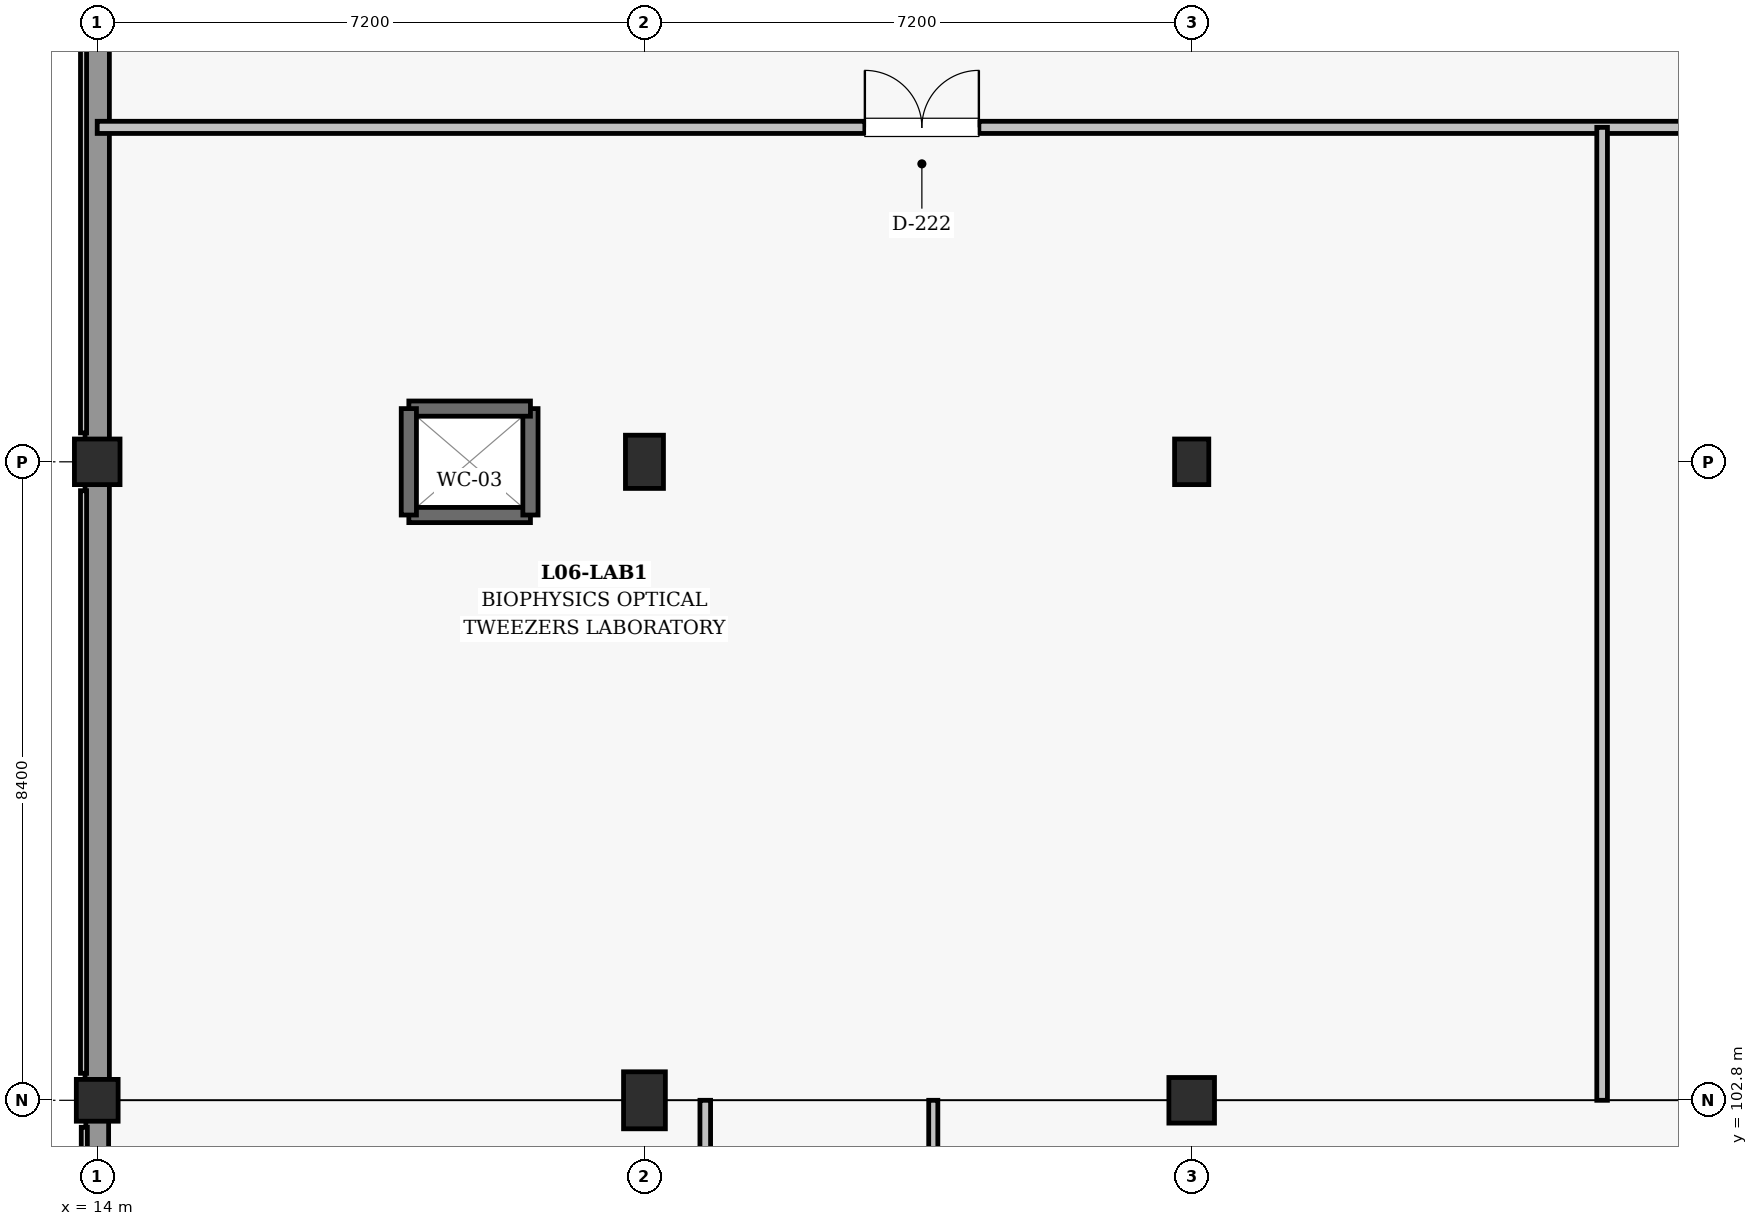
"""IFC4 building model, lengths in metres.
Left out: names, types, materials, properties, quantities, classifications, styles, units other than length and angle.
Written with IfcOpenShell. Run it as: python <this file> out.ifc"""

import sys

from ifc_helpers import new_model, si_unit, direction, frame, frame_2d, origin, origin_2d, place, context, subcontext, project, spatial, rectangle, extrude, element, fill, save


model = new_model("IFC4")
c1 = context("Model", 3, precision=1e-05, world=origin(), true_north=direction((0.0, 1.0)))
c2 = subcontext(c1, "Body", "Model", "MODEL_VIEW")
j1 = project(units=[si_unit("LENGTHUNIT", "METRE"), si_unit("PLANEANGLEUNIT", "RADIAN")], contexts=[c1])
p1 = place(None, origin())
s1 = spatial("IfcSite", under=j1, at=p1, CompositionType="ELEMENT")
p2 = place(p1, origin())
s2 = spatial("IfcBuilding", under=s1, at=p2, CompositionType="ELEMENT")
p3 = place(p2, frame((0.0, 0.0, 27.9)))
s3 = spatial("IfcBuildingStorey", under=s2, at=p3, CompositionType="ELEMENT", Elevation=27.9)
p4 = place(p3, frame((14.0, 102.8, 0.0), z_axis=(0.0, 0.0, 1.0), x_axis=(1.0, 0.0, 0.0)))
e1 = element("IfcColumn", 1, at=p4, inside=s3, PredefinedType="COLUMN", context=c2, shape_type="SweptSolid", body=[
    extrude(rectangle(XDim=0.55, YDim=0.55, at=origin_2d()), origin(), (0.0, 0.0, 1.0), 4.5),
])
p5 = place(p3, frame((14.0, 111.2, 0.0), z_axis=(0.0, 0.0, 1.0), x_axis=(1.0, 0.0, 0.0)))
e2 = element("IfcColumn", 2, at=p5, inside=s3, PredefinedType="COLUMN", context=c2, shape_type="SweptSolid", body=[
    extrude(rectangle(XDim=0.6, YDim=0.6, at=origin_2d()), origin(), (0.0, 0.0, 1.0), 4.5),
])
p6 = place(p3, frame((21.2, 102.8, 0.0), z_axis=(0.0, 0.0, 1.0), x_axis=(1.0, 0.0, 0.0)))
e3 = element("IfcColumn", 3, at=p6, inside=s3, PredefinedType="COLUMN", context=c2, shape_type="SweptSolid", body=[
    extrude(rectangle(XDim=0.55, YDim=0.75, at=origin_2d()), origin(), (0.0, 0.0, 1.0), 4.5),
])
p7 = place(p3, frame((21.2, 111.2, 0.0), z_axis=(0.0, 0.0, 1.0), x_axis=(1.0, 0.0, 0.0)))
e4 = element("IfcColumn", 4, at=p7, inside=s3, PredefinedType="COLUMN", context=c2, shape_type="SweptSolid", body=[
    extrude(rectangle(XDim=0.5, YDim=0.7, at=origin_2d()), origin(), (0.0, 0.0, 1.0), 4.5),
])
p8 = place(p3, frame((28.4, 102.8, 0.0), z_axis=(0.0, 0.0, 1.0), x_axis=(1.0, 0.0, 0.0)))
e5 = element("IfcColumn", 5, at=p8, inside=s3, PredefinedType="COLUMN", context=c2, shape_type="SweptSolid", body=[
    extrude(rectangle(XDim=0.6, YDim=0.6, at=origin_2d()), origin(), (0.0, 0.0, 1.0), 4.5),
])
p9 = place(p3, frame((28.4, 111.2, 0.0), z_axis=(0.0, 0.0, 1.0), x_axis=(1.0, 0.0, 0.0)))
e6 = element("IfcColumn", 6, at=p9, inside=s3, PredefinedType="COLUMN", context=c2, shape_type="SweptSolid", body=[
    extrude(rectangle(XDim=0.45, YDim=0.6, at=origin_2d()), origin(), (0.0, 0.0, 1.0), 4.5),
])
p10 = place(p3, frame((14.0, 103.055, 0.0), z_axis=(0.0, 0.0, 1.0), x_axis=(0.0, 1.0, 0.0)))
e7 = element("IfcWall", 7, at=p10, inside=s3, PredefinedType="SOLIDWALL", context=c2, shape_type="SweptSolid", body=[
    extrude(rectangle(XDim=7.865, YDim=0.32, at=frame_2d((3.933, 0.0))), origin(), (0.0, 0.0, 1.0), 3.355),
])
p11 = place(p3, frame((14.0, 111.48, 0.0), z_axis=(0.0, 0.0, 1.0), x_axis=(0.0, 1.0, 0.0)))
e8 = element("IfcWall", 8, at=p11, inside=s3, PredefinedType="SOLIDWALL", context=c2, shape_type="SweptSolid", body=[
    extrude(rectangle(XDim=7.765, YDim=0.32, at=frame_2d((3.883, 0.0))), origin(), (0.0, 0.0, 1.0), 3.405),
])
p12 = place(p3, frame((14.0, 94.63, 0.0), z_axis=(0.0, 0.0, 1.0), x_axis=(0.0, 1.0, 0.0)))
e9 = element("IfcWall", 9, at=p12, inside=s3, PredefinedType="SOLIDWALL", context=c2, shape_type="SweptSolid", body=[
    extrude(rectangle(XDim=7.915, YDim=0.3, at=frame_2d((3.958, 0.0))), origin(), (0.0, 0.0, 1.0), 3.355),
])
p13 = place(p3, frame((18.1, 110.5, 0.0), z_axis=(0.0, 0.0, 1.0), x_axis=(1.0, 0.0, 0.0)))
e10 = element("IfcWall", 10, at=p13, inside=s3, PredefinedType="SHEAR", context=c2, shape_type="SweptSolid", body=[
    extrude(rectangle(XDim=1.6, YDim=0.2, at=frame_2d((0.8, 0.0))), origin(), (0.0, 0.0, 1.0), 4.14),
])
p14 = place(p3, frame((19.7, 110.5, 0.0), z_axis=(0.0, 0.0, 1.0), x_axis=(0.0, 1.0, 0.0)))
e11 = element("IfcWall", 11, at=p14, inside=s3, PredefinedType="SHEAR", context=c2, shape_type="SweptSolid", body=[
    extrude(rectangle(XDim=1.4, YDim=0.2, at=frame_2d((0.7, 0.0))), origin(), (0.0, 0.0, 1.0), 4.14),
])
p15 = place(p3, frame((19.7, 111.9, 0.0), z_axis=(0.0, 0.0, 1.0), x_axis=(-1.0, 0.0, 0.0)))
e12 = element("IfcWall", 12, at=p15, inside=s3, PredefinedType="SHEAR", context=c2, shape_type="SweptSolid", body=[
    extrude(rectangle(XDim=1.6, YDim=0.2, at=frame_2d((0.8, 0.0))), origin(), (0.0, 0.0, 1.0), 4.14),
])
p16 = place(p3, frame((18.1, 111.9, 0.0), z_axis=(0.0, 0.0, 1.0), x_axis=(0.0, -1.0, 0.0)))
e13 = element("IfcWall", 13, at=p16, inside=s3, PredefinedType="SHEAR", context=c2, shape_type="SweptSolid", body=[
    extrude(rectangle(XDim=1.4, YDim=0.2, at=frame_2d((0.7, 0.0))), origin(), (0.0, 0.0, 1.0), 4.14),
])
p17 = place(p3, frame((14.0, 115.6, 0.0), z_axis=(0.0, 0.0, 1.0), x_axis=(1.0, 0.0, 0.0)))
e14 = element("IfcWall", 14, at=p17, inside=s3, PredefinedType="PARTITIONING", context=c2, shape_type="SweptSolid", body=[
    extrude(rectangle(XDim=93.6, YDim=0.16, at=frame_2d((46.8, 0.0))), origin(), (0.0, 0.0, 1.0), 2.96),
])
p18 = place(p17, frame((29.9, 0.0, 0.0)))
e15 = element("IfcOpeningElement", 15, at=p18, cuts=e14, PredefinedType="OPENING", context=c2, shape_type="SweptSolid", body=[
    extrude(rectangle(XDim=1.0, YDim=2.15, at=frame_2d((0.5, 1.075))), frame((0.0, 0.09, 0.0), z_axis=(0.0, -1.0, 0.0), x_axis=(1.0, 0.0, 0.0)), (0.0, 0.0, 1.0), 0.18),
])
p19 = place(p17, frame((10.1, 0.0, 0.0)))
e16 = element("IfcOpeningElement", 16, at=p19, cuts=e14, PredefinedType="OPENING", context=c2, shape_type="SweptSolid", body=[
    extrude(rectangle(XDim=1.5, YDim=2.25, at=frame_2d((0.75, 1.125))), frame((0.0, 0.09, 0.0), z_axis=(0.0, -1.0, 0.0), x_axis=(1.0, 0.0, 0.0)), (0.0, 0.0, 1.0), 0.18),
])
p20 = place(p17, frame((24.5, 0.0, 0.0)))
e17 = element("IfcOpeningElement", 17, at=p20, cuts=e14, PredefinedType="OPENING", context=c2, shape_type="SweptSolid", body=[
    extrude(rectangle(XDim=1.18, YDim=2.2, at=frame_2d((0.59, 1.1))), frame((0.0, 0.09, 0.0), z_axis=(0.0, -1.0, 0.0), x_axis=(1.0, 0.0, 0.0)), (0.0, 0.0, 1.0), 0.18),
])
p21 = place(p17, frame((38.7, 0.0, 0.0)))
e18 = element("IfcOpeningElement", 18, at=p21, cuts=e14, PredefinedType="OPENING", context=c2, shape_type="SweptSolid", body=[
    extrude(rectangle(XDim=1.5, YDim=2.25, at=frame_2d((0.75, 1.125))), frame((0.0, 0.09, 0.0), z_axis=(0.0, -1.0, 0.0), x_axis=(1.0, 0.0, 0.0)), (0.0, 0.0, 1.0), 0.18),
])
p22 = place(p17, frame((52.4, 0.0, 0.0)))
e19 = element("IfcOpeningElement", 19, at=p22, cuts=e14, PredefinedType="OPENING", context=c2, shape_type="SweptSolid", body=[
    extrude(rectangle(XDim=1.5, YDim=2.25, at=frame_2d((0.75, 1.125))), frame((0.0, 0.09, 0.0), z_axis=(0.0, -1.0, 0.0), x_axis=(1.0, 0.0, 0.0)), (0.0, 0.0, 1.0), 0.18),
])
p23 = place(p17, frame((69.3, 0.0, 0.0)))
e20 = element("IfcOpeningElement", 20, at=p23, cuts=e14, PredefinedType="OPENING", context=c2, shape_type="SweptSolid", body=[
    extrude(rectangle(XDim=1.5, YDim=2.25, at=frame_2d((0.75, 1.125))), frame((0.0, 0.09, 0.0), z_axis=(0.0, -1.0, 0.0), x_axis=(1.0, 0.0, 0.0)), (0.0, 0.0, 1.0), 0.18),
])
p24 = place(p17, frame((88.2, 0.0, 0.0)))
e21 = element("IfcOpeningElement", 21, at=p24, cuts=e14, PredefinedType="OPENING", context=c2, shape_type="SweptSolid", body=[
    extrude(rectangle(XDim=1.6, YDim=2.25, at=frame_2d((0.8, 1.125))), frame((0.0, 0.09, 0.0), z_axis=(0.0, -1.0, 0.0), x_axis=(1.0, 0.0, 0.0)), (0.0, 0.0, 1.0), 0.18),
])
p25 = place(p3, frame((33.8, 102.8, 0.0), z_axis=(0.0, 0.0, 1.0), x_axis=(0.0, 1.0, 0.0)))
e22 = element("IfcWall", 22, at=p25, inside=s3, PredefinedType="PARTITIONING", context=c2, shape_type="SweptSolid", body=[
    extrude(rectangle(XDim=12.8, YDim=0.14, at=frame_2d((6.4, 0.0))), origin(), (0.0, 0.0, 1.0), 3.41),
])
p26 = place(p3, frame((25.0, 28.4, 0.0), z_axis=(0.0, 0.0, 1.0), x_axis=(0.0, 1.0, 0.0)))
e23 = element("IfcWall", 23, at=p26, inside=s3, PredefinedType="PARTITIONING", context=c2, shape_type="SweptSolid", body=[
    extrude(rectangle(XDim=74.4, YDim=0.12, at=frame_2d((37.2, 0.0))), origin(), (0.0, 0.0, 1.0), 3.36),
])
p27 = place(p26, frame((9.2, 0.0, 0.0)))
e24 = element("IfcOpeningElement", 24, at=p27, cuts=e23, PredefinedType="OPENING", context=c2, shape_type="SweptSolid", body=[
    extrude(rectangle(XDim=1.0, YDim=2.15, at=frame_2d((0.5, 1.075))), frame((0.0, 0.07, 0.0), z_axis=(0.0, -1.0, 0.0), x_axis=(1.0, 0.0, 0.0)), (0.0, 0.0, 1.0), 0.14),
])
p28 = place(p26, frame((27.0, 0.0, 0.0)))
e25 = element("IfcOpeningElement", 25, at=p28, cuts=e23, PredefinedType="OPENING", context=c2, shape_type="SweptSolid", body=[
    extrude(rectangle(XDim=1.1, YDim=2.15, at=frame_2d((0.55, 1.075))), frame((0.0, 0.07, 0.0), z_axis=(0.0, -1.0, 0.0), x_axis=(1.0, 0.0, 0.0)), (0.0, 0.0, 1.0), 0.14),
])
p29 = place(p26, frame((45.0, 0.0, 0.0)))
e26 = element("IfcOpeningElement", 26, at=p29, cuts=e23, PredefinedType="OPENING", context=c2, shape_type="SweptSolid", body=[
    extrude(rectangle(XDim=1.18, YDim=2.2, at=frame_2d((0.59, 1.1))), frame((0.0, 0.07, 0.0), z_axis=(0.0, -1.0, 0.0), x_axis=(1.0, 0.0, 0.0)), (0.0, 0.0, 1.0), 0.14),
])
p30 = place(p26, frame((66.0, 0.0, 0.0)))
e27 = element("IfcOpeningElement", 27, at=p30, cuts=e23, PredefinedType="OPENING", context=c2, shape_type="SweptSolid", body=[
    extrude(rectangle(XDim=1.25, YDim=2.2, at=frame_2d((0.625, 1.1))), frame((0.0, 0.07, 0.0), z_axis=(0.0, -1.0, 0.0), x_axis=(1.0, 0.0, 0.0)), (0.0, 0.0, 1.0), 0.14),
])
p31 = place(p3, frame((22.0, 63.2, 0.0), z_axis=(0.0, 0.0, 1.0), x_axis=(0.0, 1.0, 0.0)))
e28 = element("IfcWall", 28, at=p31, inside=s3, PredefinedType="PARTITIONING", context=c2, shape_type="SweptSolid", body=[
    extrude(rectangle(XDim=39.6, YDim=0.14, at=frame_2d((19.8, 0.0))), origin(), (0.0, 0.0, 1.0), 3.36),
])
p32 = place(p31, frame((11.3, 0.0, 0.0)))
e29 = element("IfcOpeningElement", 29, at=p32, cuts=e28, PredefinedType="OPENING", context=c2, shape_type="SweptSolid", body=[
    extrude(rectangle(XDim=1.0, YDim=2.15, at=frame_2d((0.5, 1.075))), frame((0.0, 0.08, 0.0), z_axis=(0.0, -1.0, 0.0), x_axis=(1.0, 0.0, 0.0)), (0.0, 0.0, 1.0), 0.16),
])
p33 = place(p31, frame((26.3, 0.0, 0.0)))
e30 = element("IfcOpeningElement", 30, at=p33, cuts=e28, PredefinedType="OPENING", context=c2, shape_type="SweptSolid", body=[
    extrude(rectangle(XDim=1.1, YDim=2.15, at=frame_2d((0.55, 1.075))), frame((0.0, 0.08, 0.0), z_axis=(0.0, -1.0, 0.0), x_axis=(1.0, 0.0, 0.0)), (0.0, 0.0, 1.0), 0.16),
])
p34 = place(p19, origin())
e31 = element("IfcDoor", 31, at=p34, inside=s3, OperationType="DOUBLE_DOOR_SINGLE_SWING", PredefinedType="DOOR", context=c2, shape_type="SweptSolid", body=[
    extrude(rectangle(XDim=1.5, YDim=2.25, at=frame_2d((0.75, 1.125))), frame((0.0, 0.025, 0.0), z_axis=(0.0, -1.0, 0.0), x_axis=(1.0, 0.0, 0.0)), (0.0, 0.0, 1.0), 0.05),
])
fill(e16, e31)
save(model, sys.argv[1])
